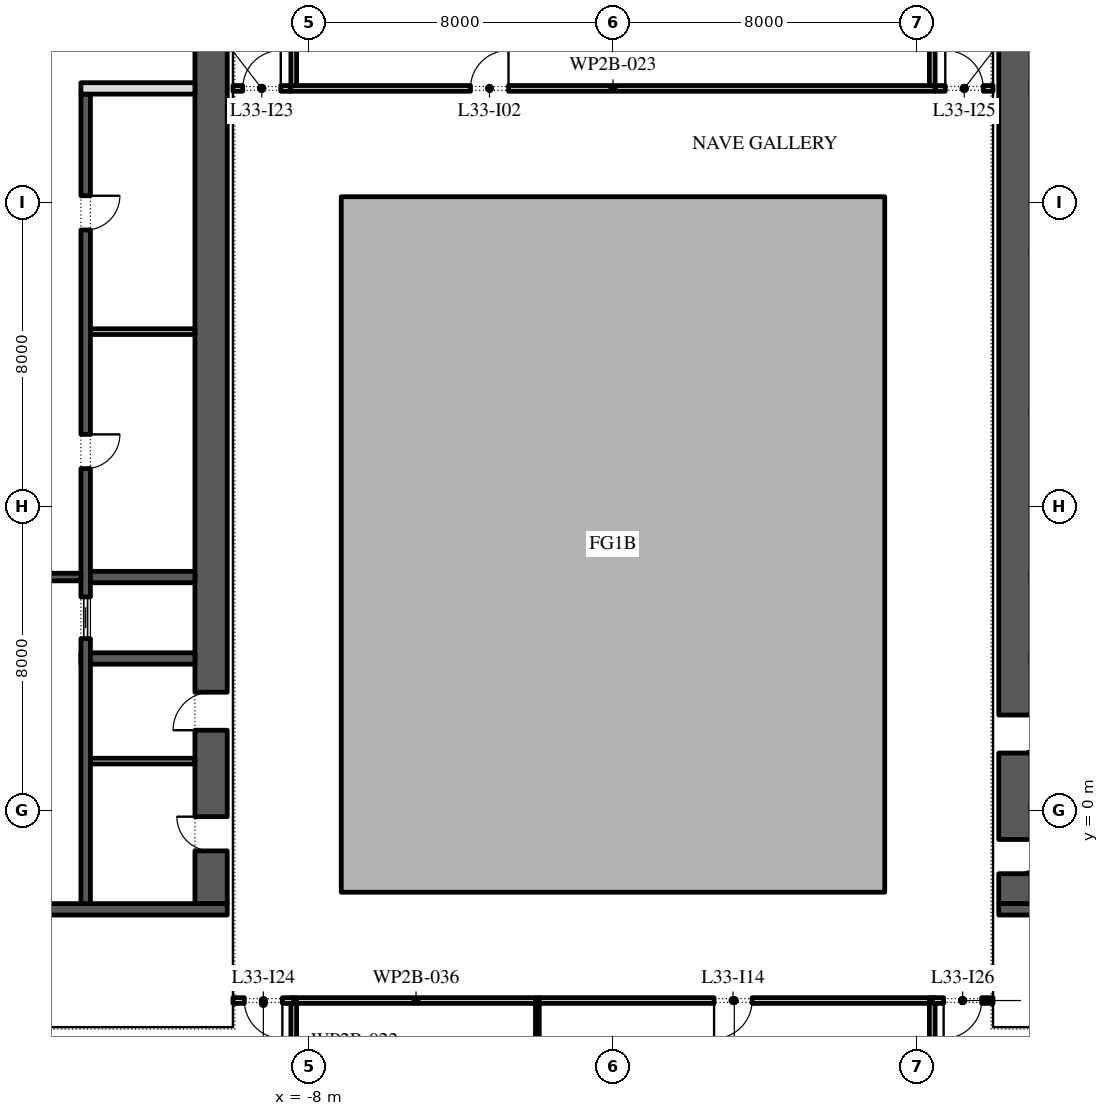
"""IFC4 building model, lengths in metres.
Left out: names, types, materials, properties, quantities, classifications, styles, units other than length and angle.
Written with IfcOpenShell. Run it as: python <this file> out.ifc"""

import sys

from ifc_helpers import new_model, si_unit, direction, frame, frame_2d, origin, place, context, subcontext, project, spatial, polyline, rectangle, outline, extrude, element, fill, save


model = new_model("IFC4")
c1 = context("Model", 3, precision=1e-05, world=origin(), true_north=direction((0.0, 1.0)))
c2 = subcontext(c1, "Body", "Model", "MODEL_VIEW")
j1 = project(units=[si_unit("LENGTHUNIT", "METRE"), si_unit("PLANEANGLEUNIT", "RADIAN")], contexts=[c1])
p1 = place(None, origin())
s1 = spatial("IfcSite", under=j1, at=p1, CompositionType="ELEMENT")
p2 = place(p1, origin())
s2 = spatial("IfcBuilding", under=s1, at=p2, CompositionType="ELEMENT")
p3 = place(p2, frame((0.0, 0.0, 151.8)))
s3 = spatial("IfcBuildingStorey", under=s2, at=p3, CompositionType="ELEMENT", Elevation=151.8)
p4 = place(p3, origin())
e1 = element("IfcWall", 1, at=p4, inside=s3, PredefinedType="STANDARD", context=c2, shape_type="SweptSolid", body=[
    extrude(outline(polyline([(-7.15, -2.15), (7.15, -2.15), (7.15, 16.15), (-7.15, 16.15), (-7.15, -2.15)]), holes=[polyline([(-7.0, -2.0), (-7.0, 16.0), (7.0, 16.0), (7.0, -2.0), (-7.0, -2.0)])]), origin(), (0.0, 0.0, 1.0), 3.95),
])
p5 = place(p3, frame((-10.575, -2.45, 0.0), z_axis=(0.0, 0.0, 1.0), x_axis=(0.0, 1.0, 0.0)))
e2 = element("IfcWall", 2, at=p5, inside=s3, PredefinedType="SHEAR", context=c2, shape_type="SweptSolid", body=[
    extrude(rectangle(XDim=27.9, YDim=0.85, at=frame_2d((13.95, 0.0))), origin(), (0.0, 0.0, 1.0), 3.95),
])
p6 = place(p5, frame((23.65, 0.0, 0.0)))
e3 = element("IfcOpeningElement", 3, at=p6, cuts=e2, PredefinedType="OPENING", context=c2, shape_type="SweptSolid", body=[
    extrude(rectangle(XDim=2.4, YDim=2.1, at=frame_2d((1.2, 1.05))), frame((0.0, 0.435, 0.0), z_axis=(0.0, -1.0, 0.0), x_axis=(1.0, 0.0, 0.0)), (0.0, 0.0, 1.0), 0.87),
])
p7 = place(p5, frame((1.387, 0.0, 0.0)))
e4 = element("IfcOpeningElement", 4, at=p7, cuts=e2, PredefinedType="OPENING", context=c2, shape_type="SweptSolid", body=[
    extrude(rectangle(XDim=0.9, YDim=2.1, at=frame_2d((0.45, 1.05))), frame((0.0, 0.435, 0.0), z_axis=(0.0, -1.0, 0.0), x_axis=(1.0, 0.0, 0.0)), (0.0, 0.0, 1.0), 0.87),
])
p8 = place(p5, frame((4.562, 0.0, 0.0)))
e5 = element("IfcOpeningElement", 5, at=p8, cuts=e2, PredefinedType="OPENING", context=c2, shape_type="SweptSolid", body=[
    extrude(rectangle(XDim=1.0, YDim=2.1, at=frame_2d((0.5, 1.05))), frame((0.0, 0.435, 0.0), z_axis=(0.0, -1.0, 0.0), x_axis=(1.0, 0.0, 0.0)), (0.0, 0.0, 1.0), 0.87),
])
p9 = place(p3, frame((-21.85, -2.6, 0.0), z_axis=(0.0, 0.0, 1.0), x_axis=(1.0, 0.0, 0.0)))
e6 = element("IfcWall", 6, at=p9, inside=s3, PredefinedType="SHEAR", context=c2, shape_type="SweptSolid", body=[
    extrude(rectangle(XDim=11.7, YDim=0.3, at=frame_2d((5.85, 0.0))), origin(), (0.0, 0.0, 1.0), 3.95),
])
p10 = place(p3, frame((-14.0, 4.0, 0.0), z_axis=(0.0, 0.0, 1.0), x_axis=(1.0, 0.0, 0.0)))
e7 = element("IfcWall", 7, at=p10, inside=s3, PredefinedType="SHEAR", context=c2, shape_type="SweptSolid", body=[
    extrude(rectangle(XDim=3.0, YDim=0.3, at=frame_2d((1.5, 0.0))), origin(), (0.0, 0.0, 1.0), 3.95),
])
p11 = place(p3, frame((-13.75, 6.143, 0.0), z_axis=(0.0, 0.0, 1.0), x_axis=(1.0, 0.0, 0.0)))
e8 = element("IfcWall", 8, at=p11, inside=s3, PredefinedType="SHEAR", context=c2, shape_type="SweptSolid", body=[
    extrude(rectangle(XDim=2.75, YDim=0.3, at=frame_2d((1.375, 0.0))), origin(), (0.0, 0.0, 1.0), 3.95),
])
p12 = place(p3, frame((-13.875, -2.45, 0.0), z_axis=(0.0, 0.0, 1.0), x_axis=(0.0, 1.0, 0.0)))
e9 = element("IfcWall", 9, at=p12, inside=s3, PredefinedType="SHEAR", context=c2, shape_type="SweptSolid", body=[
    extrude(rectangle(XDim=21.3, YDim=0.25, at=frame_2d((10.65, 0.0))), origin(), (0.0, 0.0, 1.0), 3.95),
])
p13 = place(p12, frame((11.446, 0.0, 0.0)))
e10 = element("IfcOpeningElement", 10, at=p13, cuts=e9, PredefinedType="OPENING", context=c2, shape_type="SweptSolid", body=[
    extrude(rectangle(XDim=0.9, YDim=2.1, at=frame_2d((0.45, 1.05))), frame((0.0, 0.135, 0.0), z_axis=(0.0, -1.0, 0.0), x_axis=(1.0, 0.0, 0.0)), (0.0, 0.0, 1.0), 0.27),
])
p14 = place(p12, frame((17.725, 0.0, 0.0)))
e11 = element("IfcOpeningElement", 11, at=p14, cuts=e9, PredefinedType="OPENING", context=c2, shape_type="SweptSolid", body=[
    extrude(rectangle(XDim=0.9, YDim=2.1, at=frame_2d((0.45, 1.05))), frame((0.0, 0.135, 0.0), z_axis=(0.0, -1.0, 0.0), x_axis=(1.0, 0.0, 0.0)), (0.0, 0.0, 1.0), 0.27),
])
p15 = place(p12, frame((6.971, 0.0, 0.0)))
e12 = element("IfcOpeningElement", 12, at=p15, cuts=e9, PredefinedType="OPENING", context=c2, shape_type="SweptSolid", body=[
    extrude(rectangle(XDim=1.1, YDim=2.1, at=frame_2d((0.55, 1.05))), frame((0.0, 0.135, 0.0), z_axis=(0.0, -1.0, 0.0), x_axis=(1.0, 0.0, 0.0)), (0.0, 0.0, 1.0), 0.27),
])
p16 = place(p3, frame((-14.0, 19.0, 0.0), z_axis=(0.0, 0.0, 1.0), x_axis=(1.0, 0.0, 0.0)))
e13 = element("IfcWall", 13, at=p16, inside=s3, PredefinedType="PARTITIONING", context=c2, shape_type="SweptSolid", body=[
    extrude(rectangle(XDim=3.0, YDim=0.3, at=frame_2d((1.5, 0.0))), origin(), (0.0, 0.0, 1.0), 3.95),
])
p17 = place(p3, frame((-13.75, 12.6, 0.0), z_axis=(0.0, 0.0, 1.0), x_axis=(1.0, 0.0, 0.0)))
e14 = element("IfcWall", 14, at=p17, inside=s3, PredefinedType="PARTITIONING", context=c2, shape_type="SweptSolid", body=[
    extrude(rectangle(XDim=2.75, YDim=0.15, at=frame_2d((1.375, 0.0))), origin(), (0.0, 0.0, 1.0), 3.95),
])
p18 = place(p3, frame((-18.0, 6.143, 0.0), z_axis=(0.0, 0.0, 1.0), x_axis=(1.0, 0.0, 0.0)))
e15 = element("IfcWall", 15, at=p18, inside=s3, PredefinedType="SHEAR", context=c2, shape_type="SweptSolid", body=[
    extrude(rectangle(XDim=4.0, YDim=0.2, at=frame_2d((2.0, 0.0))), origin(), (0.0, 0.0, 1.0), 3.95),
])
p19 = place(p18, frame((1.4, 0.0, 0.0)))
e16 = element("IfcOpeningElement", 16, at=p19, cuts=e15, PredefinedType="OPENING", context=c2, shape_type="SweptSolid", body=[
    extrude(rectangle(XDim=1.2, YDim=2.1, at=frame_2d((0.6, 1.05))), frame((0.0, 0.11, 0.0), z_axis=(0.0, -1.0, 0.0), x_axis=(1.0, 0.0, 0.0)), (0.0, 0.0, 1.0), 0.22),
])
p20 = place(p3, frame((-13.75, 1.3, 0.0), z_axis=(0.0, 0.0, 1.0), x_axis=(1.0, 0.0, 0.0)))
e17 = element("IfcWall", 17, at=p20, inside=s3, PredefinedType="PARTITIONING", context=c2, shape_type="SweptSolid", body=[
    extrude(rectangle(XDim=2.75, YDim=0.15, at=frame_2d((1.375, 0.0))), origin(), (0.0, 0.0, 1.0), 3.95),
])
p21 = place(p3, frame((10.575, -2.45, 0.0), z_axis=(0.0, 0.0, 1.0), x_axis=(0.0, 1.0, 0.0)))
e18 = element("IfcWall", 18, at=p21, inside=s3, PredefinedType="SHEAR", context=c2, shape_type="SweptSolid", body=[
    extrude(rectangle(XDim=27.9, YDim=0.85, at=frame_2d((13.95, 0.0))), origin(), (0.0, 0.0, 1.0), 3.95),
])
p22 = place(p21, frame((23.65, 0.0, 0.0)))
e19 = element("IfcOpeningElement", 19, at=p22, cuts=e18, PredefinedType="OPENING", context=c2, shape_type="SweptSolid", body=[
    extrude(rectangle(XDim=2.4, YDim=2.1, at=frame_2d((1.2, 1.05))), frame((0.0, 0.435, 0.0), z_axis=(0.0, -1.0, 0.0), x_axis=(1.0, 0.0, 0.0)), (0.0, 0.0, 1.0), 0.87),
])
p23 = place(p21, frame((0.788, 0.0, 0.0)))
e20 = element("IfcOpeningElement", 20, at=p23, cuts=e18, PredefinedType="OPENING", context=c2, shape_type="SweptSolid", body=[
    extrude(rectangle(XDim=0.9, YDim=2.1, at=frame_2d((0.45, 1.05))), frame((0.0, 0.435, 0.0), z_axis=(0.0, -1.0, 0.0), x_axis=(1.0, 0.0, 0.0)), (0.0, 0.0, 1.0), 0.87),
])
p24 = place(p21, frame((3.962, 0.0, 0.0)))
e21 = element("IfcOpeningElement", 21, at=p24, cuts=e18, PredefinedType="OPENING", context=c2, shape_type="SweptSolid", body=[
    extrude(rectangle(XDim=1.0, YDim=2.1, at=frame_2d((0.5, 1.05))), frame((0.0, 0.435, 0.0), z_axis=(0.0, -1.0, 0.0), x_axis=(1.0, 0.0, 0.0)), (0.0, 0.0, 1.0), 0.87),
])
p25 = place(p3, frame((10.15, -2.6, 0.0), z_axis=(0.0, 0.0, 1.0), x_axis=(1.0, 0.0, 0.0)))
e22 = element("IfcWall", 22, at=p25, inside=s3, PredefinedType="SHEAR", context=c2, shape_type="SweptSolid", body=[
    extrude(rectangle(XDim=11.7, YDim=0.3, at=frame_2d((5.85, 0.0))), origin(), (0.0, 0.0, 1.0), 3.95),
])
p26 = place(p3, frame((-8.4, -4.925, 0.0), z_axis=(0.0, 0.0, 1.0), x_axis=(0.0, -1.0, 0.0)))
e23 = element("IfcWall", 23, at=p26, inside=s3, PredefinedType="PARTITIONING", context=c2, shape_type="SweptSolid", body=[
    extrude(rectangle(XDim=2.3, YDim=0.15, at=frame_2d((1.15, 0.0))), origin(), (0.0, 0.0, 1.0), 3.95),
])
p27 = place(p3, frame((-8.475, 19.0, 0.0), z_axis=(0.0, 0.0, 1.0), x_axis=(1.0, 0.0, 0.0)))
e24 = element("IfcWall", 24, at=p27, inside=s3, PredefinedType="PARTITIONING", context=c2, shape_type="SweptSolid", body=[
    extrude(rectangle(XDim=16.95, YDim=0.15, at=frame_2d((8.475, 0.0))), origin(), (0.0, 0.0, 1.0), 3.95),
])
p28 = place(p27, frame((4.725, 0.0, 0.0)))
e25 = element("IfcOpeningElement", 25, at=p28, cuts=e24, PredefinedType="OPENING", context=c2, shape_type="SweptSolid", body=[
    extrude(rectangle(XDim=1.0, YDim=2.1, at=frame_2d((0.5, 1.05))), frame((0.0, 0.085, 0.0), z_axis=(0.0, -1.0, 0.0), x_axis=(1.0, 0.0, 0.0)), (0.0, 0.0, 1.0), 0.17),
])
p29 = place(p3, frame((-8.4, 23.485, 0.0), z_axis=(0.0, 0.0, 1.0), x_axis=(0.0, -1.0, 0.0)))
e26 = element("IfcWall", 26, at=p29, inside=s3, PredefinedType="PARTITIONING", context=c2, shape_type="SweptSolid", body=[
    extrude(rectangle(XDim=4.41, YDim=0.15, at=frame_2d((2.205, 0.0))), origin(), (0.0, 0.0, 1.0), 3.95),
])
p30 = place(p3, frame((-1.99, -11.2, 0.0), z_axis=(0.0, 0.0, 1.0), x_axis=(0.0, 1.0, 0.0)))
e27 = element("IfcWall", 27, at=p30, inside=s3, PredefinedType="PARTITIONING", context=c2, shape_type="SweptSolid", body=[
    extrude(rectangle(XDim=6.275, YDim=0.1, at=frame_2d((3.137, 0.0))), origin(), (0.0, 0.0, 1.0), 3.95),
])
p31 = place(p3, frame((-2.04, -5.0, 0.0), z_axis=(0.0, 0.0, 1.0), x_axis=(-1.0, 0.0, 0.0)))
e28 = element("IfcWall", 28, at=p31, inside=s3, PredefinedType="PARTITIONING", context=c2, shape_type="SweptSolid", body=[
    extrude(rectangle(XDim=6.285, YDim=0.15, at=frame_2d((3.143, 0.0))), origin(), (0.0, 0.0, 1.0), 3.95),
])
p32 = place(p3, frame((8.4, -7.375, 0.0), z_axis=(0.0, 0.0, 1.0), x_axis=(0.0, 1.0, 0.0)))
e29 = element("IfcWall", 29, at=p32, inside=s3, PredefinedType="PARTITIONING", context=c2, shape_type="SweptSolid", body=[
    extrude(rectangle(XDim=2.45, YDim=0.15, at=frame_2d((1.225, 0.0))), origin(), (0.0, 0.0, 1.0), 3.95),
])
p33 = place(p3, frame((8.325, -5.0, 0.0), z_axis=(0.0, 0.0, 1.0), x_axis=(-1.0, 0.0, 0.0)))
e30 = element("IfcWall", 30, at=p33, inside=s3, PredefinedType="PARTITIONING", context=c2, shape_type="SweptSolid", body=[
    extrude(rectangle(XDim=10.265, YDim=0.15, at=frame_2d((5.132, 0.0))), origin(), (0.0, 0.0, 1.0), 3.95),
])
p34 = place(p33, frame((4.665, 0.0, 0.0)))
e31 = element("IfcOpeningElement", 31, at=p34, cuts=e30, PredefinedType="OPENING", context=c2, shape_type="SweptSolid", body=[
    extrude(rectangle(XDim=1.0, YDim=2.1, at=frame_2d((0.5, 1.05))), frame((0.0, 0.085, 0.0), z_axis=(0.0, -1.0, 0.0), x_axis=(1.0, 0.0, 0.0)), (0.0, 0.0, 1.0), 0.17),
])
p35 = place(p3, frame((8.4, 19.075, 0.0), z_axis=(0.0, 0.0, 1.0), x_axis=(0.0, 1.0, 0.0)))
e32 = element("IfcWall", 32, at=p35, inside=s3, PredefinedType="PARTITIONING", context=c2, shape_type="SweptSolid", body=[
    extrude(rectangle(XDim=4.41, YDim=0.15, at=frame_2d((2.205, 0.0))), origin(), (0.0, 0.0, 1.0), 3.95),
])
p36 = place(p3, frame((-10.0, 19.0, 0.0), z_axis=(0.0, 0.0, 1.0), x_axis=(1.0, 0.0, 0.0)))
e33 = element("IfcWall", 33, at=p36, inside=s3, PredefinedType="PARTITIONING", context=c2, shape_type="SweptSolid", body=[
    extrude(rectangle(XDim=1.515, YDim=0.15, at=frame_2d((0.757, 0.0))), origin(), (0.0, 0.0, 1.0), 3.95),
])
p37 = place(p36, frame((0.258, 0.0, 0.0)))
e34 = element("IfcOpeningElement", 34, at=p37, cuts=e33, PredefinedType="OPENING", context=c2, shape_type="SweptSolid", body=[
    extrude(rectangle(XDim=1.0, YDim=2.1, at=frame_2d((0.5, 1.05))), frame((0.0, 0.085, 0.0), z_axis=(0.0, -1.0, 0.0), x_axis=(1.0, 0.0, 0.0)), (0.0, 0.0, 1.0), 0.17),
])
p38 = place(p3, frame((-8.4, -5.0, 0.0), z_axis=(0.0, 0.0, 1.0), x_axis=(-1.0, 0.0, 0.0)))
e35 = element("IfcWall", 35, at=p38, inside=s3, PredefinedType="PARTITIONING", context=c2, shape_type="SweptSolid", body=[
    extrude(rectangle(XDim=1.6, YDim=0.15, at=frame_2d((0.8, 0.0))), origin(), (0.0, 0.0, 1.0), 3.95),
])
p39 = place(p38, frame((0.3, 0.0, 0.0)))
e36 = element("IfcOpeningElement", 36, at=p39, cuts=e35, PredefinedType="OPENING", context=c2, shape_type="SweptSolid", body=[
    extrude(rectangle(XDim=1.0, YDim=2.1, at=frame_2d((0.5, 1.05))), frame((0.0, 0.085, 0.0), z_axis=(0.0, -1.0, 0.0), x_axis=(1.0, 0.0, 0.0)), (0.0, 0.0, 1.0), 0.17),
])
p40 = place(p3, frame((8.485, 19.0, 0.0), z_axis=(0.0, 0.0, 1.0), x_axis=(1.0, 0.0, 0.0)))
e37 = element("IfcWall", 37, at=p40, inside=s3, PredefinedType="PARTITIONING", context=c2, shape_type="SweptSolid", body=[
    extrude(rectangle(XDim=1.515, YDim=0.15, at=frame_2d((0.757, 0.0))), origin(), (0.0, 0.0, 1.0), 3.95),
])
p41 = place(p40, frame((0.258, 0.0, 0.0)))
e38 = element("IfcOpeningElement", 38, at=p41, cuts=e37, PredefinedType="OPENING", context=c2, shape_type="SweptSolid", body=[
    extrude(rectangle(XDim=1.0, YDim=2.1, at=frame_2d((0.5, 1.05))), frame((0.0, 0.085, 0.0), z_axis=(0.0, -1.0, 0.0), x_axis=(1.0, 0.0, 0.0)), (0.0, 0.0, 1.0), 0.17),
])
p42 = place(p3, frame((10.0, -5.0, 0.0), z_axis=(0.0, 0.0, 1.0), x_axis=(-1.0, 0.0, 0.0)))
e39 = element("IfcWall", 39, at=p42, inside=s3, PredefinedType="PARTITIONING", context=c2, shape_type="SweptSolid", body=[
    extrude(rectangle(XDim=1.6, YDim=0.15, at=frame_2d((0.8, 0.0))), origin(), (0.0, 0.0, 1.0), 3.95),
])
p43 = place(p42, frame((0.3, 0.0, 0.0)))
e40 = element("IfcOpeningElement", 40, at=p43, cuts=e39, PredefinedType="OPENING", context=c2, shape_type="SweptSolid", body=[
    extrude(rectangle(XDim=1.0, YDim=2.1, at=frame_2d((0.5, 1.05))), frame((0.0, 0.085, 0.0), z_axis=(0.0, -1.0, 0.0), x_axis=(1.0, 0.0, 0.0)), (0.0, 0.0, 1.0), 0.17),
])
p44 = place(p13, frame((0.9, -0.2, 0.0), z_axis=(0.0, 0.0, 1.0), x_axis=(-1.0, 0.0, 0.0)))
e41 = element("IfcDoor", 41, at=p44, inside=s3, OperationType="SINGLE_SWING_RIGHT", PredefinedType="DOOR", context=c2, shape_type="SweptSolid", body=[
    extrude(rectangle(XDim=0.9, YDim=2.1, at=frame_2d((0.45, 1.05))), frame((0.0, -0.075, 0.0), z_axis=(0.0, -1.0, 0.0), x_axis=(1.0, 0.0, 0.0)), (0.0, 0.0, 1.0), 0.05),
])
fill(e10, e41)
p45 = place(p14, frame((0.9, -0.2, 0.0), z_axis=(0.0, 0.0, 1.0), x_axis=(-1.0, 0.0, 0.0)))
e42 = element("IfcDoor", 42, at=p45, inside=s3, OperationType="SINGLE_SWING_RIGHT", PredefinedType="DOOR", context=c2, shape_type="SweptSolid", body=[
    extrude(rectangle(XDim=0.9, YDim=2.1, at=frame_2d((0.45, 1.05))), frame((0.0, -0.075, 0.0), z_axis=(0.0, -1.0, 0.0), x_axis=(1.0, 0.0, 0.0)), (0.0, 0.0, 1.0), 0.05),
])
fill(e11, e42)
p46 = place(p15, origin())
e43 = element("IfcDoor", 43, at=p46, inside=s3, OperationType="SLIDING_TO_LEFT", PredefinedType="DOOR", context=c2, shape_type="SweptSolid", body=[
    extrude(rectangle(XDim=1.1, YDim=2.1, at=frame_2d((0.55, 1.05))), frame((0.0, 0.025, 0.0), z_axis=(0.0, -1.0, 0.0), x_axis=(1.0, 0.0, 0.0)), (0.0, 0.0, 1.0), 0.05),
])
fill(e12, e43)
p47 = place(p7, origin())
e44 = element("IfcDoor", 44, at=p47, inside=s3, OperationType="SINGLE_SWING_LEFT", PredefinedType="DOOR", context=c2, shape_type="SweptSolid", body=[
    extrude(rectangle(XDim=0.9, YDim=2.1, at=frame_2d((0.45, 1.05))), frame((0.0, 0.425, 0.0), z_axis=(0.0, -1.0, 0.0), x_axis=(1.0, 0.0, 0.0)), (0.0, 0.0, 1.0), 0.05),
])
fill(e4, e44)
p48 = place(p8, origin())
e45 = element("IfcDoor", 45, at=p48, inside=s3, OperationType="SINGLE_SWING_RIGHT", PredefinedType="DOOR", context=c2, shape_type="SweptSolid", body=[
    extrude(rectangle(XDim=1.0, YDim=2.1, at=frame_2d((0.5, 1.05))), frame((0.0, 0.425, 0.0), z_axis=(0.0, -1.0, 0.0), x_axis=(1.0, 0.0, 0.0)), (0.0, 0.0, 1.0), 0.05),
])
fill(e5, e45)
p49 = place(p23, frame((0.9, -0.8, 0.0), z_axis=(0.0, 0.0, 1.0), x_axis=(-1.0, 0.0, 0.0)))
e46 = element("IfcDoor", 46, at=p49, inside=s3, OperationType="SINGLE_SWING_RIGHT", PredefinedType="DOOR", context=c2, shape_type="SweptSolid", body=[
    extrude(rectangle(XDim=0.9, YDim=2.1, at=frame_2d((0.45, 1.05))), frame((0.0, -0.375, 0.0), z_axis=(0.0, -1.0, 0.0), x_axis=(1.0, 0.0, 0.0)), (0.0, 0.0, 1.0), 0.05),
])
fill(e20, e46)
p50 = place(p24, frame((1.0, -0.8, 0.0), z_axis=(0.0, 0.0, 1.0), x_axis=(-1.0, 0.0, 0.0)))
e47 = element("IfcDoor", 47, at=p50, inside=s3, OperationType="SINGLE_SWING_RIGHT", PredefinedType="DOOR", context=c2, shape_type="SweptSolid", body=[
    extrude(rectangle(XDim=1.0, YDim=2.1, at=frame_2d((0.5, 1.05))), frame((0.0, -0.375, 0.0), z_axis=(0.0, -1.0, 0.0), x_axis=(1.0, 0.0, 0.0)), (0.0, 0.0, 1.0), 0.05),
])
fill(e21, e47)
p51 = place(p28, origin())
e48 = element("IfcDoor", 48, at=p51, inside=s3, OperationType="SINGLE_SWING_LEFT", PredefinedType="DOOR", context=c2, shape_type="SweptSolid", body=[
    extrude(rectangle(XDim=1.0, YDim=2.1, at=frame_2d((0.5, 1.05))), frame((0.0, 0.025, 0.0), z_axis=(0.0, -1.0, 0.0), x_axis=(1.0, 0.0, 0.0)), (0.0, 0.0, 1.0), 0.05),
])
fill(e25, e48)
p52 = place(p34, origin())
e49 = element("IfcDoor", 49, at=p52, inside=s3, OperationType="SINGLE_SWING_LEFT", PredefinedType="DOOR", context=c2, shape_type="SweptSolid", body=[
    extrude(rectangle(XDim=1.0, YDim=2.1, at=frame_2d((0.5, 1.05))), frame((0.0, 0.025, 0.0), z_axis=(0.0, -1.0, 0.0), x_axis=(1.0, 0.0, 0.0)), (0.0, 0.0, 1.0), 0.05),
])
fill(e31, e49)
p53 = place(p37, origin())
e50 = element("IfcDoor", 50, at=p53, inside=s3, OperationType="SINGLE_SWING_LEFT", PredefinedType="DOOR", context=c2, shape_type="SweptSolid", body=[
    extrude(rectangle(XDim=1.0, YDim=2.1, at=frame_2d((0.5, 1.05))), frame((0.0, 0.025, 0.0), z_axis=(0.0, -1.0, 0.0), x_axis=(1.0, 0.0, 0.0)), (0.0, 0.0, 1.0), 0.05),
])
fill(e34, e50)
p54 = place(p39, origin())
e51 = element("IfcDoor", 51, at=p54, inside=s3, OperationType="SINGLE_SWING_RIGHT", PredefinedType="DOOR", context=c2, shape_type="SweptSolid", body=[
    extrude(rectangle(XDim=1.0, YDim=2.1, at=frame_2d((0.5, 1.05))), frame((0.0, 0.025, 0.0), z_axis=(0.0, -1.0, 0.0), x_axis=(1.0, 0.0, 0.0)), (0.0, 0.0, 1.0), 0.05),
])
fill(e36, e51)
p55 = place(p41, origin())
e52 = element("IfcDoor", 52, at=p55, inside=s3, OperationType="SINGLE_SWING_RIGHT", PredefinedType="DOOR", context=c2, shape_type="SweptSolid", body=[
    extrude(rectangle(XDim=1.0, YDim=2.1, at=frame_2d((0.5, 1.05))), frame((0.0, 0.025, 0.0), z_axis=(0.0, -1.0, 0.0), x_axis=(1.0, 0.0, 0.0)), (0.0, 0.0, 1.0), 0.05),
])
fill(e38, e52)
p56 = place(p43, origin())
e53 = element("IfcDoor", 53, at=p56, inside=s3, OperationType="SINGLE_SWING_LEFT", PredefinedType="DOOR", context=c2, shape_type="SweptSolid", body=[
    extrude(rectangle(XDim=1.0, YDim=2.1, at=frame_2d((0.5, 1.05))), frame((0.0, 0.025, 0.0), z_axis=(0.0, -1.0, 0.0), x_axis=(1.0, 0.0, 0.0)), (0.0, 0.0, 1.0), 0.05),
])
fill(e40, e53)
save(model, sys.argv[1])
